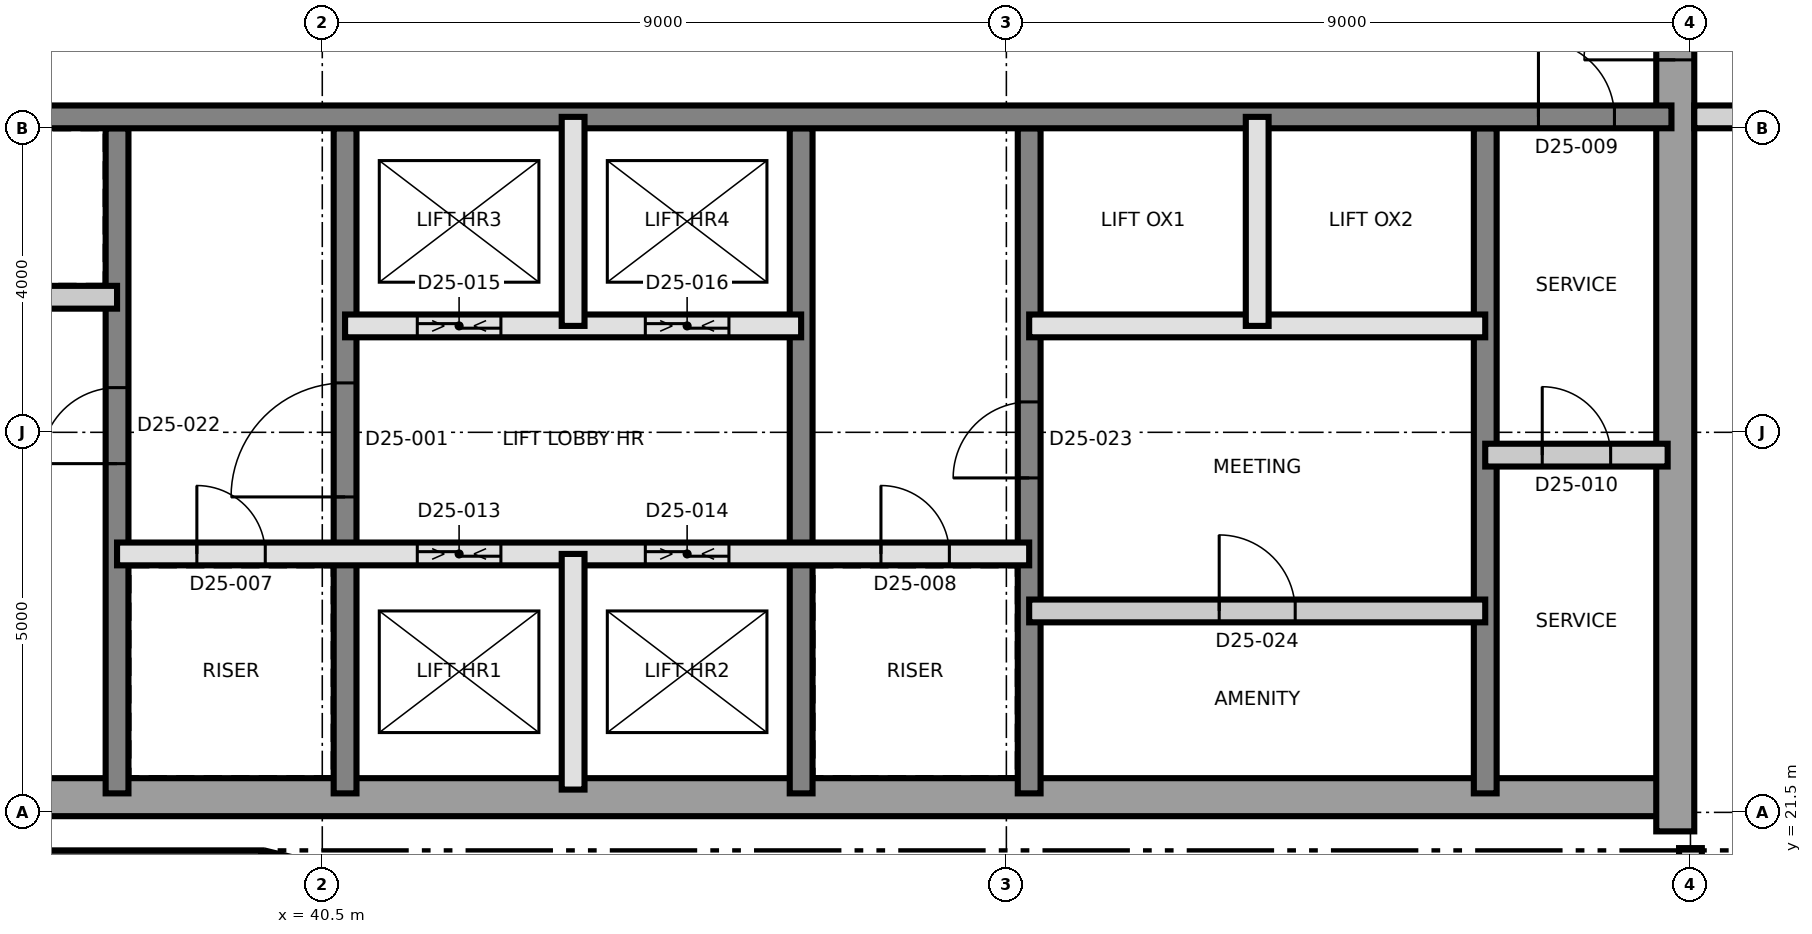
"""IFC4 building model, lengths in metres.
Left out: names, types, materials, properties, quantities, classifications, styles, units other than length and angle.
Written with IfcOpenShell. Run it as: python <this file> out.ifc"""

import sys

from ifc_helpers import new_model, si_unit, direction, frame, frame_2d, origin, place, context, subcontext, project, spatial, rectangle, extrude, element, fill, save


model = new_model("IFC4")
c1 = context("Model", 3, precision=1e-05, world=origin(), true_north=direction((0.0, 1.0)))
c2 = subcontext(c1, "Body", "Model", "MODEL_VIEW")
j1 = project(units=[si_unit("LENGTHUNIT", "METRE"), si_unit("PLANEANGLEUNIT", "RADIAN")], contexts=[c1])
p1 = place(None, origin())
s1 = spatial("IfcSite", under=j1, at=p1, CompositionType="ELEMENT")
p2 = place(p1, origin())
s2 = spatial("IfcBuilding", under=s1, at=p2, CompositionType="ELEMENT")
p3 = place(p2, frame((0.0, 0.0, 229.1)))
s3 = spatial("IfcBuildingStorey", under=s2, at=p3, CompositionType="ELEMENT", Elevation=229.1)
p4 = place(p3, frame((31.25, 21.7, 0.0), z_axis=(0.0, 0.0, 1.0), x_axis=(1.0, 0.0, 0.0)))
e1 = element("IfcWall", 1, at=p4, inside=s3, PredefinedType="SHEAR", context=c2, shape_type="SweptSolid", body=[
    extrude(rectangle(XDim=27.0, YDim=0.5, at=frame_2d((13.5, 0.0))), origin(), (0.0, 0.0, 1.0), 3.7),
])
p5 = place(p3, frame((58.3, 21.25, 0.0), z_axis=(0.0, 0.0, 1.0), x_axis=(0.0, 1.0, 0.0)))
e2 = element("IfcWall", 2, at=p5, inside=s3, PredefinedType="SHEAR", context=c2, shape_type="SweptSolid", body=[
    extrude(rectangle(XDim=18.5, YDim=0.5, at=frame_2d((9.25, 0.0))), origin(), (0.0, 0.0, 1.0), 3.7),
])
p6 = place(p5, frame((10.15, 0.0, 0.0)))
e3 = element("IfcOpeningElement", 3, at=p6, cuts=e2, PredefinedType="OPENING", context=c2, shape_type="SweptSolid", body=[
    extrude(rectangle(XDim=1.2, YDim=2.1, at=frame_2d((0.6, 1.05))), frame((0.0, 0.26, 0.0), z_axis=(0.0, -1.0, 0.0), x_axis=(1.0, 0.0, 0.0)), (0.0, 0.0, 1.0), 0.52),
])
p7 = place(p3, frame((37.8, 21.75, 0.0), z_axis=(0.0, 0.0, 1.0), x_axis=(0.0, 1.0, 0.0)))
e4 = element("IfcWall", 4, at=p7, inside=s3, PredefinedType="SHEAR", context=c2, shape_type="SweptSolid", body=[
    extrude(rectangle(XDim=8.75, YDim=0.3, at=frame_2d((4.375, 0.0))), origin(), (0.0, 0.0, 1.0), 3.7),
])
p8 = place(p7, frame((4.338, 0.0, 0.0)))
e5 = element("IfcOpeningElement", 5, at=p8, cuts=e4, PredefinedType="OPENING", context=c2, shape_type="SweptSolid", body=[
    extrude(rectangle(XDim=1.0, YDim=2.1, at=frame_2d((0.5, 1.05))), frame((0.0, 0.16, 0.0), z_axis=(0.0, -1.0, 0.0), x_axis=(1.0, 0.0, 0.0)), (0.0, 0.0, 1.0), 0.32),
])
p9 = place(p3, frame((40.8, 21.75, 0.0), z_axis=(0.0, 0.0, 1.0), x_axis=(0.0, 1.0, 0.0)))
e6 = element("IfcWall", 6, at=p9, inside=s3, PredefinedType="SHEAR", context=c2, shape_type="SweptSolid", body=[
    extrude(rectangle(XDim=8.75, YDim=0.3, at=frame_2d((4.375, 0.0))), origin(), (0.0, 0.0, 1.0), 3.7),
])
p10 = place(p9, frame((3.9, 0.0, 0.0)))
e7 = element("IfcOpeningElement", 7, at=p10, cuts=e6, PredefinedType="OPENING", context=c2, shape_type="SweptSolid", body=[
    extrude(rectangle(XDim=1.5, YDim=2.1, at=frame_2d((0.75, 1.05))), frame((0.0, 0.16, 0.0), z_axis=(0.0, -1.0, 0.0), x_axis=(1.0, 0.0, 0.0)), (0.0, 0.0, 1.0), 0.32),
])
p11 = place(p3, frame((46.8, 21.75, 0.0), z_axis=(0.0, 0.0, 1.0), x_axis=(0.0, 1.0, 0.0)))
e8 = element("IfcWall", 8, at=p11, inside=s3, PredefinedType="SHEAR", context=c2, shape_type="SweptSolid", body=[
    extrude(rectangle(XDim=8.75, YDim=0.3, at=frame_2d((4.375, 0.0))), origin(), (0.0, 0.0, 1.0), 3.7),
])
p12 = place(p3, frame((49.8, 21.75, 0.0), z_axis=(0.0, 0.0, 1.0), x_axis=(0.0, 1.0, 0.0)))
e9 = element("IfcWall", 9, at=p12, inside=s3, PredefinedType="SHEAR", context=c2, shape_type="SweptSolid", body=[
    extrude(rectangle(XDim=8.75, YDim=0.3, at=frame_2d((4.375, 0.0))), origin(), (0.0, 0.0, 1.0), 3.7),
])
p13 = place(p12, frame((4.15, 0.0, 0.0)))
e10 = element("IfcOpeningElement", 10, at=p13, cuts=e9, PredefinedType="OPENING", context=c2, shape_type="SweptSolid", body=[
    extrude(rectangle(XDim=1.0, YDim=2.1, at=frame_2d((0.5, 1.05))), frame((0.0, 0.16, 0.0), z_axis=(0.0, -1.0, 0.0), x_axis=(1.0, 0.0, 0.0)), (0.0, 0.0, 1.0), 0.32),
])
p14 = place(p3, frame((55.8, 21.75, 0.0), z_axis=(0.0, 0.0, 1.0), x_axis=(0.0, 1.0, 0.0)))
e11 = element("IfcWall", 11, at=p14, inside=s3, PredefinedType="SHEAR", context=c2, shape_type="SweptSolid", body=[
    extrude(rectangle(XDim=8.75, YDim=0.3, at=frame_2d((4.375, 0.0))), origin(), (0.0, 0.0, 1.0), 3.7),
])
p15 = place(p3, frame((31.75, 30.65, 0.0), z_axis=(0.0, 0.0, 1.0), x_axis=(1.0, 0.0, 0.0)))
e12 = element("IfcWall", 12, at=p15, inside=s3, PredefinedType="SHEAR", context=c2, shape_type="SweptSolid", body=[
    extrude(rectangle(XDim=26.5, YDim=0.3, at=frame_2d((13.25, 0.0))), origin(), (0.0, 0.0, 1.0), 3.7),
])
p16 = place(p15, frame((24.75, 0.0, 0.0)))
e13 = element("IfcOpeningElement", 13, at=p16, cuts=e12, PredefinedType="OPENING", context=c2, shape_type="SweptSolid", body=[
    extrude(rectangle(XDim=1.0, YDim=2.1, at=frame_2d((0.5, 1.05))), frame((0.0, 0.16, 0.0), z_axis=(0.0, -1.0, 0.0), x_axis=(1.0, 0.0, 0.0)), (0.0, 0.0, 1.0), 0.32),
])
p17 = place(p15, frame((4.05, 0.0, 0.0)))
e14 = element("IfcOpeningElement", 14, at=p17, cuts=e12, PredefinedType="OPENING", context=c2, shape_type="SweptSolid", body=[
    extrude(rectangle(XDim=1.0, YDim=2.1, at=frame_2d((0.5, 1.05))), frame((0.0, 0.16, 0.0), z_axis=(0.0, -1.0, 0.0), x_axis=(1.0, 0.0, 0.0)), (0.0, 0.0, 1.0), 0.32),
])
p18 = place(p3, frame((31.36, 20.85, 0.0), z_axis=(0.0, 0.0, 1.0), x_axis=(1.0, 0.0, 0.0)))
e15 = element("IfcWall", 15, at=p18, inside=s3, PredefinedType="SOLIDWALL", context=c2, shape_type="SweptSolid", body=[
    extrude(rectangle(XDim=8.34, YDim=0.3, at=frame_2d((4.17, 0.0))), origin(), (0.0, 0.0, 1.0), 3.4),
])
p19 = place(p3, frame((39.735, 20.846, 0.0), z_axis=(0.0, 0.0, 1.0), x_axis=(0.97206095595, -0.234728562212, 0.0)))
e16 = element("IfcWall", 16, at=p19, inside=s3, PredefinedType="SOLIDWALL", context=c2, shape_type="SweptSolid", body=[
    extrude(rectangle(XDim=2.35, YDim=0.3, at=frame_2d((1.175, 0.0))), origin(), (0.0, 0.0, 1.0), 3.4),
])
p20 = place(p3, frame((49.8, 24.15, 0.0), z_axis=(0.0, 0.0, 1.0), x_axis=(1.0, 0.0, 0.0)))
e17 = element("IfcWall", 17, at=p20, inside=s3, PredefinedType="PARTITIONING", context=c2, shape_type="SweptSolid", body=[
    extrude(rectangle(XDim=6.0, YDim=0.3, at=frame_2d((3.0, 0.0))), origin(), (0.0, 0.0, 1.0), 3.4),
])
p21 = place(p20, frame((2.5, 0.0, 0.0)))
e18 = element("IfcOpeningElement", 18, at=p21, cuts=e17, PredefinedType="OPENING", context=c2, shape_type="SweptSolid", body=[
    extrude(rectangle(XDim=1.0, YDim=2.1, at=frame_2d((0.5, 1.05))), frame((0.0, 0.16, 0.0), z_axis=(0.0, -1.0, 0.0), x_axis=(1.0, 0.0, 0.0)), (0.0, 0.0, 1.0), 0.32),
])
p22 = place(p3, frame((37.8, 24.9, 0.0), z_axis=(0.0, 0.0, 1.0), x_axis=(1.0, 0.0, 0.0)))
e19 = element("IfcWall", 19, at=p22, inside=s3, PredefinedType="SOLIDWALL", context=c2, shape_type="SweptSolid", body=[
    extrude(rectangle(XDim=12.0, YDim=0.3, at=frame_2d((6.0, 0.0))), origin(), (0.0, 0.0, 1.0), 3.4),
])
p23 = place(p22, frame((1.05, 0.0, 0.0)))
e20 = element("IfcOpeningElement", 20, at=p23, cuts=e19, PredefinedType="OPENING", context=c2, shape_type="SweptSolid", body=[
    extrude(rectangle(XDim=0.9, YDim=2.1, at=frame_2d((0.45, 1.05))), frame((0.0, 0.16, 0.0), z_axis=(0.0, -1.0, 0.0), x_axis=(1.0, 0.0, 0.0)), (0.0, 0.0, 1.0), 0.32),
])
p24 = place(p22, frame((10.05, 0.0, 0.0)))
e21 = element("IfcOpeningElement", 21, at=p24, cuts=e19, PredefinedType="OPENING", context=c2, shape_type="SweptSolid", body=[
    extrude(rectangle(XDim=0.9, YDim=2.1, at=frame_2d((0.45, 1.05))), frame((0.0, 0.16, 0.0), z_axis=(0.0, -1.0, 0.0), x_axis=(1.0, 0.0, 0.0)), (0.0, 0.0, 1.0), 0.32),
])
p25 = place(p22, frame((3.95, 0.0, 0.0)))
e22 = element("IfcOpeningElement", 22, at=p25, cuts=e19, PredefinedType="OPENING", context=c2, shape_type="SweptSolid", body=[
    extrude(rectangle(XDim=1.1, YDim=2.4, at=frame_2d((0.55, 1.2))), frame((0.0, 0.16, 0.0), z_axis=(0.0, -1.0, 0.0), x_axis=(1.0, 0.0, 0.0)), (0.0, 0.0, 1.0), 0.32),
])
p26 = place(p22, frame((6.95, 0.0, 0.0)))
e23 = element("IfcOpeningElement", 23, at=p26, cuts=e19, PredefinedType="OPENING", context=c2, shape_type="SweptSolid", body=[
    extrude(rectangle(XDim=1.1, YDim=2.4, at=frame_2d((0.55, 1.2))), frame((0.0, 0.16, 0.0), z_axis=(0.0, -1.0, 0.0), x_axis=(1.0, 0.0, 0.0)), (0.0, 0.0, 1.0), 0.32),
])
p27 = place(p3, frame((55.8, 26.2, 0.0), z_axis=(0.0, 0.0, 1.0), x_axis=(1.0, 0.0, 0.0)))
e24 = element("IfcWall", 24, at=p27, inside=s3, PredefinedType="PARTITIONING", context=c2, shape_type="SweptSolid", body=[
    extrude(rectangle(XDim=2.4, YDim=0.3, at=frame_2d((1.2, 0.0))), origin(), (0.0, 0.0, 1.0), 3.4),
])
p28 = place(p27, frame((0.75, 0.0, 0.0)))
e25 = element("IfcOpeningElement", 25, at=p28, cuts=e24, PredefinedType="OPENING", context=c2, shape_type="SweptSolid", body=[
    extrude(rectangle(XDim=0.9, YDim=2.1, at=frame_2d((0.45, 1.05))), frame((0.0, 0.16, 0.0), z_axis=(0.0, -1.0, 0.0), x_axis=(1.0, 0.0, 0.0)), (0.0, 0.0, 1.0), 0.32),
])
p29 = place(p3, frame((40.8, 27.9, 0.0), z_axis=(0.0, 0.0, 1.0), x_axis=(1.0, 0.0, 0.0)))
e26 = element("IfcWall", 26, at=p29, inside=s3, PredefinedType="SOLIDWALL", context=c2, shape_type="SweptSolid", body=[
    extrude(rectangle(XDim=6.0, YDim=0.3, at=frame_2d((3.0, 0.0))), origin(), (0.0, 0.0, 1.0), 3.4),
])
p30 = place(p29, frame((0.95, 0.0, 0.0)))
e27 = element("IfcOpeningElement", 27, at=p30, cuts=e26, PredefinedType="OPENING", context=c2, shape_type="SweptSolid", body=[
    extrude(rectangle(XDim=1.1, YDim=2.4, at=frame_2d((0.55, 1.2))), frame((0.0, 0.16, 0.0), z_axis=(0.0, -1.0, 0.0), x_axis=(1.0, 0.0, 0.0)), (0.0, 0.0, 1.0), 0.32),
])
p31 = place(p29, frame((3.95, 0.0, 0.0)))
e28 = element("IfcOpeningElement", 28, at=p31, cuts=e26, PredefinedType="OPENING", context=c2, shape_type="SweptSolid", body=[
    extrude(rectangle(XDim=1.1, YDim=2.4, at=frame_2d((0.55, 1.2))), frame((0.0, 0.16, 0.0), z_axis=(0.0, -1.0, 0.0), x_axis=(1.0, 0.0, 0.0)), (0.0, 0.0, 1.0), 0.32),
])
p32 = place(p3, frame((49.8, 27.9, 0.0), z_axis=(0.0, 0.0, 1.0), x_axis=(1.0, 0.0, 0.0)))
e29 = element("IfcWall", 29, at=p32, inside=s3, PredefinedType="SOLIDWALL", context=c2, shape_type="SweptSolid", body=[
    extrude(rectangle(XDim=6.0, YDim=0.3, at=frame_2d((3.0, 0.0))), origin(), (0.0, 0.0, 1.0), 3.4),
])
p33 = place(p3, frame((31.8, 28.277, 0.0), z_axis=(0.0, 0.0, 1.0), x_axis=(1.0, 0.0, 0.0)))
e30 = element("IfcWall", 30, at=p33, inside=s3, PredefinedType="PARTITIONING", context=c2, shape_type="SweptSolid", body=[
    extrude(rectangle(XDim=6.0, YDim=0.3, at=frame_2d((3.0, 0.0))), origin(), (0.0, 0.0, 1.0), 3.4),
])
p34 = place(p3, frame((43.8, 21.8, 0.0), z_axis=(0.0, 0.0, 1.0), x_axis=(0.0, 1.0, 0.0)))
e31 = element("IfcWall", 31, at=p34, inside=s3, PredefinedType="SOLIDWALL", context=c2, shape_type="SweptSolid", body=[
    extrude(rectangle(XDim=3.1, YDim=0.3, at=frame_2d((1.55, 0.0))), origin(), (0.0, 0.0, 1.0), 3.4),
])
for number, where, z_axis, x_axis in (
    (32, (43.8, 27.9, 0.0), (0.0, 0.0, 1.0), (0.0, 1.0, 0.0)),
    (33, (52.8, 27.9, 0.0), (0.0, 0.0, 1.0), (0.0, 1.0, 0.0)),
):
    element("IfcWall", number, at=place(p3, frame(where, z_axis=z_axis, x_axis=x_axis)), inside=s3, PredefinedType="SOLIDWALL", context=c2, shape_type="SweptSolid", body=[
        extrude(rectangle(XDim=2.75, YDim=0.3, at=frame_2d((1.375, 0.0))), origin(), (0.0, 0.0, 1.0), 3.4),
    ])
p35 = place(p3, frame((58.55, 30.65, 0.0), z_axis=(0.0, 0.0, 1.0), x_axis=(1.0, 0.0, 0.0)))
e34 = element("IfcWall", 34, at=p35, inside=s3, PredefinedType="PARTITIONING", context=c2, shape_type="SweptSolid", body=[
    extrude(rectangle(XDim=26.78, YDim=0.3, at=frame_2d((13.39, 0.0))), origin(), (0.0, 0.0, 1.0), 3.4),
])
p36 = place(p35, frame((1.65, 0.0, 0.0)))
e35 = element("IfcOpeningElement", 35, at=p36, cuts=e34, PredefinedType="OPENING", context=c2, shape_type="SweptSolid", body=[
    extrude(rectangle(XDim=1.2, YDim=2.1, at=frame_2d((0.6, 1.05))), frame((0.0, 0.16, 0.0), z_axis=(0.0, -1.0, 0.0), x_axis=(1.0, 0.0, 0.0)), (0.0, 0.0, 1.0), 0.32),
])
p37 = place(p35, frame((4.9, 0.0, 0.0)))
e36 = element("IfcOpeningElement", 36, at=p37, cuts=e34, PredefinedType="OPENING", context=c2, shape_type="SweptSolid", body=[
    extrude(rectangle(XDim=1.0, YDim=2.1, at=frame_2d((0.5, 1.05))), frame((0.0, 0.16, 0.0), z_axis=(0.0, -1.0, 0.0), x_axis=(1.0, 0.0, 0.0)), (0.0, 0.0, 1.0), 0.32),
])
p38 = place(p35, frame((12.95, 0.0, 0.0)))
e37 = element("IfcOpeningElement", 37, at=p38, cuts=e34, PredefinedType="OPENING", context=c2, shape_type="SweptSolid", body=[
    extrude(rectangle(XDim=1.0, YDim=2.4, at=frame_2d((0.5, 1.2))), frame((0.0, 0.16, 0.0), z_axis=(0.0, -1.0, 0.0), x_axis=(1.0, 0.0, 0.0)), (0.0, 0.0, 1.0), 0.32),
])
p39 = place(p35, frame((19.085, 0.0, 0.0)))
e38 = element("IfcOpeningElement", 38, at=p39, cuts=e34, PredefinedType="OPENING", context=c2, shape_type="SweptSolid", body=[
    extrude(rectangle(XDim=1.2, YDim=2.1, at=frame_2d((0.6, 1.05))), frame((0.0, 0.16, 0.0), z_axis=(0.0, -1.0, 0.0), x_axis=(1.0, 0.0, 0.0)), (0.0, 0.0, 1.0), 0.32),
])
p40 = place(p35, frame((22.335, 0.0, 0.0)))
e39 = element("IfcOpeningElement", 39, at=p40, cuts=e34, PredefinedType="OPENING", context=c2, shape_type="SweptSolid", body=[
    extrude(rectangle(XDim=1.0, YDim=2.1, at=frame_2d((0.5, 1.05))), frame((0.0, 0.16, 0.0), z_axis=(0.0, -1.0, 0.0), x_axis=(1.0, 0.0, 0.0)), (0.0, 0.0, 1.0), 0.32),
])
p41 = place(p3, frame((58.5, 20.35, 0.0), z_axis=(0.0, 0.0, 1.0), x_axis=(0.0, 1.0, 0.0)))
e40 = element("IfcWall", 40, at=p41, inside=s3, PredefinedType="PARTITIONING", context=c2, shape_type="SweptSolid", body=[
    extrude(rectangle(XDim=0.68, YDim=0.3, at=frame_2d((0.34, 0.0))), origin(), (0.0, 0.0, 1.0), 3.4),
])
p42 = place(p10, origin())
e41 = element("IfcDoor", 41, at=p42, inside=s3, OperationType="SINGLE_SWING_RIGHT", PredefinedType="DOOR", context=c2, shape_type="SweptSolid", body=[
    extrude(rectangle(XDim=1.5, YDim=2.1, at=frame_2d((0.75, 1.05))), frame((0.0, 0.025, 0.0), z_axis=(0.0, -1.0, 0.0), x_axis=(1.0, 0.0, 0.0)), (0.0, 0.0, 1.0), 0.05),
])
fill(e7, e41)
p43 = place(p23, origin())
e42 = element("IfcDoor", 42, at=p43, inside=s3, OperationType="SINGLE_SWING_LEFT", PredefinedType="DOOR", context=c2, shape_type="SweptSolid", body=[
    extrude(rectangle(XDim=0.9, YDim=2.1, at=frame_2d((0.45, 1.05))), frame((0.0, 0.025, 0.0), z_axis=(0.0, -1.0, 0.0), x_axis=(1.0, 0.0, 0.0)), (0.0, 0.0, 1.0), 0.05),
])
fill(e20, e42)
p44 = place(p24, origin())
e43 = element("IfcDoor", 43, at=p44, inside=s3, OperationType="SINGLE_SWING_RIGHT", PredefinedType="DOOR", context=c2, shape_type="SweptSolid", body=[
    extrude(rectangle(XDim=0.9, YDim=2.1, at=frame_2d((0.45, 1.05))), frame((0.0, 0.025, 0.0), z_axis=(0.0, -1.0, 0.0), x_axis=(1.0, 0.0, 0.0)), (0.0, 0.0, 1.0), 0.05),
])
fill(e21, e43)
p45 = place(p16, origin())
e44 = element("IfcDoor", 44, at=p45, inside=s3, OperationType="SINGLE_SWING_LEFT", PredefinedType="DOOR", context=c2, shape_type="SweptSolid", body=[
    extrude(rectangle(XDim=1.0, YDim=2.1, at=frame_2d((0.5, 1.05))), frame((0.0, 0.025, 0.0), z_axis=(0.0, -1.0, 0.0), x_axis=(1.0, 0.0, 0.0)), (0.0, 0.0, 1.0), 0.05),
])
fill(e13, e44)
p46 = place(p28, origin())
e45 = element("IfcDoor", 45, at=p46, inside=s3, OperationType="SINGLE_SWING_RIGHT", PredefinedType="DOOR", context=c2, shape_type="SweptSolid", body=[
    extrude(rectangle(XDim=0.9, YDim=2.1, at=frame_2d((0.45, 1.05))), frame((0.0, 0.025, 0.0), z_axis=(0.0, -1.0, 0.0), x_axis=(1.0, 0.0, 0.0)), (0.0, 0.0, 1.0), 0.05),
])
fill(e25, e45)
p47 = place(p6, origin())
e46 = element("IfcDoor", 46, at=p47, inside=s3, OperationType="SINGLE_SWING_LEFT", PredefinedType="DOOR", context=c2, shape_type="SweptSolid", body=[
    extrude(rectangle(XDim=1.2, YDim=2.1, at=frame_2d((0.6, 1.05))), frame((0.0, 0.025, 0.0), z_axis=(0.0, -1.0, 0.0), x_axis=(1.0, 0.0, 0.0)), (0.0, 0.0, 1.0), 0.05),
])
fill(e3, e46)
p48 = place(p25, origin())
e47 = element("IfcDoor", 47, at=p48, inside=s3, OperationType="SLIDING_TO_LEFT", PredefinedType="DOOR", context=c2, shape_type="SweptSolid", body=[
    extrude(rectangle(XDim=1.1, YDim=2.4, at=frame_2d((0.55, 1.2))), frame((0.0, 0.025, 0.0), z_axis=(0.0, -1.0, 0.0), x_axis=(1.0, 0.0, 0.0)), (0.0, 0.0, 1.0), 0.05),
])
fill(e22, e47)
p49 = place(p26, origin())
e48 = element("IfcDoor", 48, at=p49, inside=s3, OperationType="SLIDING_TO_LEFT", PredefinedType="DOOR", context=c2, shape_type="SweptSolid", body=[
    extrude(rectangle(XDim=1.1, YDim=2.4, at=frame_2d((0.55, 1.2))), frame((0.0, 0.025, 0.0), z_axis=(0.0, -1.0, 0.0), x_axis=(1.0, 0.0, 0.0)), (0.0, 0.0, 1.0), 0.05),
])
fill(e23, e48)
p50 = place(p30, origin())
e49 = element("IfcDoor", 49, at=p50, inside=s3, OperationType="SLIDING_TO_LEFT", PredefinedType="DOOR", context=c2, shape_type="SweptSolid", body=[
    extrude(rectangle(XDim=1.1, YDim=2.4, at=frame_2d((0.55, 1.2))), frame((0.0, 0.025, 0.0), z_axis=(0.0, -1.0, 0.0), x_axis=(1.0, 0.0, 0.0)), (0.0, 0.0, 1.0), 0.05),
])
fill(e27, e49)
p51 = place(p31, origin())
e50 = element("IfcDoor", 50, at=p51, inside=s3, OperationType="SLIDING_TO_LEFT", PredefinedType="DOOR", context=c2, shape_type="SweptSolid", body=[
    extrude(rectangle(XDim=1.1, YDim=2.4, at=frame_2d((0.55, 1.2))), frame((0.0, 0.025, 0.0), z_axis=(0.0, -1.0, 0.0), x_axis=(1.0, 0.0, 0.0)), (0.0, 0.0, 1.0), 0.05),
])
fill(e28, e50)
p52 = place(p8, origin())
e51 = element("IfcDoor", 51, at=p52, inside=s3, OperationType="SINGLE_SWING_RIGHT", PredefinedType="DOOR", context=c2, shape_type="SweptSolid", body=[
    extrude(rectangle(XDim=1.0, YDim=2.1, at=frame_2d((0.5, 1.05))), frame((0.0, 0.025, 0.0), z_axis=(0.0, -1.0, 0.0), x_axis=(1.0, 0.0, 0.0)), (0.0, 0.0, 1.0), 0.05),
])
fill(e5, e51)
p53 = place(p13, origin())
e52 = element("IfcDoor", 52, at=p53, inside=s3, OperationType="SINGLE_SWING_LEFT", PredefinedType="DOOR", context=c2, shape_type="SweptSolid", body=[
    extrude(rectangle(XDim=1.0, YDim=2.1, at=frame_2d((0.5, 1.05))), frame((0.0, 0.025, 0.0), z_axis=(0.0, -1.0, 0.0), x_axis=(1.0, 0.0, 0.0)), (0.0, 0.0, 1.0), 0.05),
])
fill(e10, e52)
p54 = place(p21, origin())
e53 = element("IfcDoor", 53, at=p54, inside=s3, OperationType="SINGLE_SWING_RIGHT", PredefinedType="DOOR", context=c2, shape_type="SweptSolid", body=[
    extrude(rectangle(XDim=1.0, YDim=2.1, at=frame_2d((0.5, 1.05))), frame((0.0, 0.025, 0.0), z_axis=(0.0, -1.0, 0.0), x_axis=(1.0, 0.0, 0.0)), (0.0, 0.0, 1.0), 0.05),
])
fill(e18, e53)
save(model, sys.argv[1])
